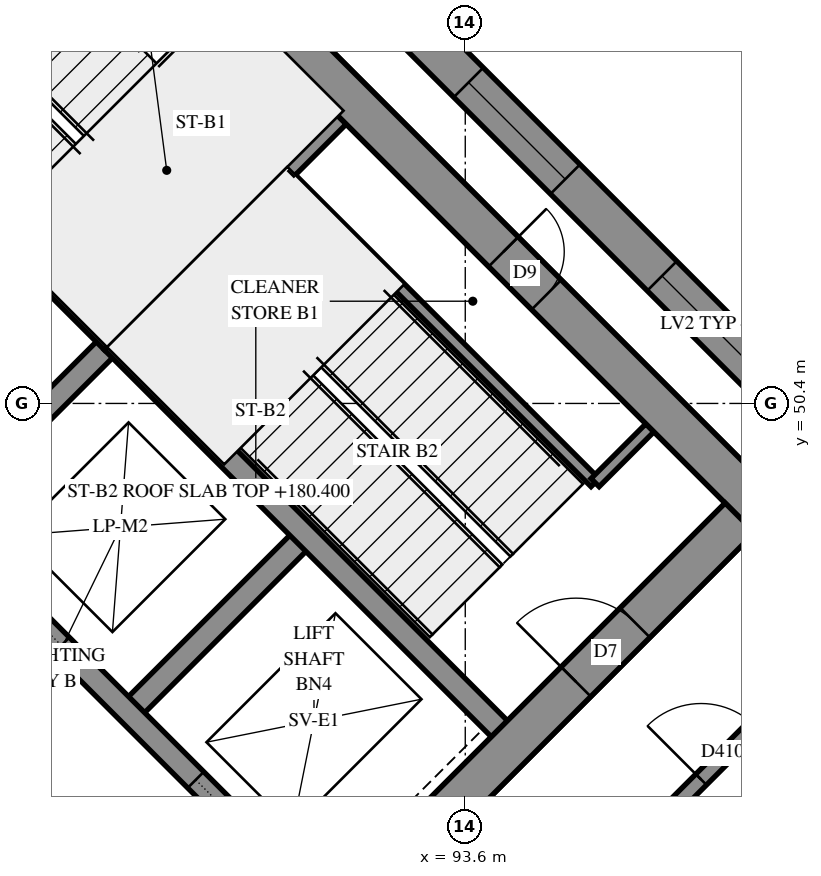
"""IFC4 building model, lengths in metres.
Left out: names, types, materials, properties, quantities, classifications, styles, units other than length and angle.
Written with IfcOpenShell. Run it as: python <this file> out.ifc"""

import sys

from ifc_helpers import new_model, si_unit, direction, frame, frame_2d, origin, place, context, subcontext, project, spatial, polyline, rectangle, outline, extrude, element, fill, save


model = new_model("IFC4")
c1 = context("Model", 3, precision=1e-05, world=origin(), true_north=direction((0.0, 1.0)))
c2 = subcontext(c1, "Body", "Model", "MODEL_VIEW")
j1 = project(units=[si_unit("LENGTHUNIT", "METRE"), si_unit("PLANEANGLEUNIT", "RADIAN")], contexts=[c1])
p1 = place(None, origin())
s1 = spatial("IfcSite", under=j1, at=p1, CompositionType="ELEMENT")
p2 = place(p1, origin())
s2 = spatial("IfcBuilding", under=s1, at=p2, CompositionType="ELEMENT")
p3 = place(p2, frame((0.0, 0.0, 180.4)))
s3 = spatial("IfcBuildingStorey", under=s2, at=p3, CompositionType="ELEMENT", Elevation=180.4)
p4 = place(p3, frame((86.642, 59.855, -0.3), z_axis=(0.0, 0.0, 1.0), x_axis=(0.707110007, -0.7071035554, 0.0)))
e1 = element("IfcWall", 1, at=p4, inside=s3, PredefinedType="SHEAR", context=c2, shape_type="SweptSolid", body=[
    extrude(rectangle(XDim=15.5, YDim=0.55, at=frame_2d((7.75, 0.0))), origin(), (0.0, 0.0, 1.0), 4.3),
])
p5 = place(p4, frame((10.55, 0.0, 0.3)))
e2 = element("IfcOpeningElement", 2, at=p5, cuts=e1, PredefinedType="OPENING", context=c2, shape_type="SweptSolid", body=[
    extrude(rectangle(XDim=0.8, YDim=2.1, at=frame_2d((0.4, 1.05))), frame((0.0, 0.285, 0.0), z_axis=(0.0, -1.0, 0.0), x_axis=(1.0, 0.0, 0.0)), (0.0, 0.0, 1.0), 0.57),
])
p6 = place(p3, frame((87.031, 38.713, -0.3), z_axis=(0.0, 0.0, 1.0), x_axis=(0.707103309, 0.7071102534, 0.0)))
e3 = element("IfcWall", 3, at=p6, inside=s3, PredefinedType="SHEAR", context=c2, shape_type="SweptSolid", body=[
    extrude(rectangle(XDim=14.4, YDim=0.55, at=frame_2d((7.2, 0.0))), origin(), (0.0, 0.0, 1.0), 4.3),
])
p7 = place(p6, frame((4.55, 0.0, 0.3)))
e4 = element("IfcOpeningElement", 4, at=p7, cuts=e3, PredefinedType="OPENING", context=c2, shape_type="SweptSolid", body=[
    extrude(rectangle(XDim=1.1, YDim=2.1, at=frame_2d((0.55, 1.05))), frame((0.0, 0.285, 0.0), z_axis=(0.0, -1.0, 0.0), x_axis=(1.0, 0.0, 0.0)), (0.0, 0.0, 1.0), 0.57),
])
p8 = place(p6, frame((11.35, 0.0, 0.3)))
e5 = element("IfcOpeningElement", 5, at=p8, cuts=e3, PredefinedType="OPENING", context=c2, shape_type="SweptSolid", body=[
    extrude(rectangle(XDim=1.1, YDim=2.1, at=frame_2d((0.55, 1.05))), frame((0.0, 0.285, 0.0), z_axis=(0.0, -1.0, 0.0), x_axis=(1.0, 0.0, 0.0)), (0.0, 0.0, 1.0), 0.57),
])
for number, where, z_axis, x_axis in (
    (6, (86.625, 48.878, 0.0), (0.0, 0.0, 1.0), (0.707, 0.707, 0.0)),
    (7, (89.17, 46.332, 0.0), (0.0, 0.0, 1.0), (0.707, 0.707, 0.0)),
):
    element("IfcWall", number, at=place(p3, frame(where, z_axis=z_axis, x_axis=x_axis)), inside=s3, PredefinedType="SOLIDWALL", context=c2, shape_type="SweptSolid", body=[
        extrude(rectangle(XDim=3.3, YDim=0.3, at=frame_2d((1.65, 0.0))), origin(), (0.0, 0.0, 1.0), 4.7),
    ])
p9 = place(p3, frame((78.988, 51.423, 0.0), z_axis=(0.0, 0.0, 1.0), x_axis=(0.7071067812, -0.7071067812, 0.0)))
e8 = element("IfcWall", 8, at=p9, inside=s3, PredefinedType="SOLIDWALL", context=c2, shape_type="SweptSolid", body=[
    extrude(rectangle(XDim=14.4, YDim=0.3, at=frame_2d((7.2, 0.0))), origin(), (0.0, 0.0, 1.0), 4.7),
])
p10 = place(p9, frame((1.35, 0.0, 0.0)))
e9 = element("IfcOpeningElement", 9, at=p10, cuts=e8, PredefinedType="OPENING", context=c2, shape_type="SweptSolid", body=[
    extrude(rectangle(XDim=0.9, YDim=2.1, at=frame_2d((0.45, 1.05))), frame((0.0, 0.16, 0.0), z_axis=(0.0, -1.0, 0.0), x_axis=(1.0, 0.0, 0.0)), (0.0, 0.0, 1.0), 0.32),
])
p11 = place(p9, frame((4.95, 0.0, 0.0)))
e10 = element("IfcOpeningElement", 10, at=p11, cuts=e8, PredefinedType="OPENING", context=c2, shape_type="SweptSolid", body=[
    extrude(rectangle(XDim=0.9, YDim=2.1, at=frame_2d((0.45, 1.05))), frame((0.0, 0.16, 0.0), z_axis=(0.0, -1.0, 0.0), x_axis=(1.0, 0.0, 0.0)), (0.0, 0.0, 1.0), 0.32),
])
p12 = place(p9, frame((8.55, 0.0, 0.0)))
e11 = element("IfcOpeningElement", 11, at=p12, cuts=e8, PredefinedType="OPENING", context=c2, shape_type="SweptSolid", body=[
    extrude(rectangle(XDim=0.9, YDim=2.1, at=frame_2d((0.45, 1.05))), frame((0.0, 0.16, 0.0), z_axis=(0.0, -1.0, 0.0), x_axis=(1.0, 0.0, 0.0)), (0.0, 0.0, 1.0), 0.32),
])
p13 = place(p9, frame((12.05, 0.0, 0.0)))
e12 = element("IfcOpeningElement", 12, at=p13, cuts=e8, PredefinedType="OPENING", context=c2, shape_type="SweptSolid", body=[
    extrude(rectangle(XDim=1.1, YDim=2.1, at=frame_2d((0.55, 1.05))), frame((0.0, 0.16, 0.0), z_axis=(0.0, -1.0, 0.0), x_axis=(1.0, 0.0, 0.0)), (0.0, 0.0, 1.0), 0.32),
])
p14 = place(p3, frame((81.534, 53.969, 0.0), z_axis=(0.0, 0.0, 1.0), x_axis=(0.707103309, -0.7071102534, 0.0)))
e13 = element("IfcWall", 13, at=p14, inside=s3, PredefinedType="SOLIDWALL", context=c2, shape_type="SweptSolid", body=[
    extrude(rectangle(XDim=14.4, YDim=0.3, at=frame_2d((7.2, 0.0))), origin(), (0.0, 0.0, 1.0), 4.7),
])
p15 = place(p14, frame((1.25, 0.0, 0.0)))
e14 = element("IfcOpeningElement", 14, at=p15, cuts=e13, PredefinedType="OPENING", context=c2, shape_type="SweptSolid", body=[
    extrude(rectangle(XDim=1.1, YDim=2.1, at=frame_2d((0.55, 1.05))), frame((0.0, 0.16, 0.0), z_axis=(0.0, -1.0, 0.0), x_axis=(1.0, 0.0, 0.0)), (0.0, 0.0, 1.0), 0.32),
])
p16 = place(p14, frame((4.85, 0.0, 0.0)))
e15 = element("IfcOpeningElement", 15, at=p16, cuts=e13, PredefinedType="OPENING", context=c2, shape_type="SweptSolid", body=[
    extrude(rectangle(XDim=1.1, YDim=2.1, at=frame_2d((0.55, 1.05))), frame((0.0, 0.16, 0.0), z_axis=(0.0, -1.0, 0.0), x_axis=(1.0, 0.0, 0.0)), (0.0, 0.0, 1.0), 0.32),
])
p17 = place(p14, frame((8.45, 0.0, 0.0)))
e16 = element("IfcOpeningElement", 16, at=p17, cuts=e13, PredefinedType="OPENING", context=c2, shape_type="SweptSolid", body=[
    extrude(rectangle(XDim=1.1, YDim=2.1, at=frame_2d((0.55, 1.05))), frame((0.0, 0.16, 0.0), z_axis=(0.0, -1.0, 0.0), x_axis=(1.0, 0.0, 0.0)), (0.0, 0.0, 1.0), 0.32),
])
p18 = place(p14, frame((12.05, 0.0, 0.0)))
e17 = element("IfcOpeningElement", 17, at=p18, cuts=e13, PredefinedType="OPENING", context=c2, shape_type="SweptSolid", body=[
    extrude(rectangle(XDim=1.1, YDim=2.1, at=frame_2d((0.55, 1.05))), frame((0.0, 0.16, 0.0), z_axis=(0.0, -1.0, 0.0), x_axis=(1.0, 0.0, 0.0)), (0.0, 0.0, 1.0), 0.32),
])
for number, where, z_axis, x_axis in (
    (18, (83.867, 56.302, 0.0), (0.0, 0.0, 1.0), (0.707, -0.707, 0.0)),
    (19, (88.958, 51.211, 0.0), (0.0, 0.0, 1.0), (0.707, -0.707, 0.0)),
):
    element("IfcWall", number, at=place(p3, frame(where, z_axis=z_axis, x_axis=x_axis)), inside=s3, PredefinedType="SOLIDWALL", context=c2, shape_type="SweptSolid", body=[
        extrude(rectangle(XDim=7.2, YDim=0.3, at=frame_2d((3.6, 0.0))), origin(), (0.0, 0.0, 1.0), 4.7),
    ])
p19 = place(p3, frame((88.958, 51.211, 0.0), z_axis=(0.0, 0.0, 1.0), x_axis=(0.7071067812, 0.7071067812, 0.0)))
e20 = element("IfcWall", 20, at=p19, inside=s3, PredefinedType="SOLIDWALL", context=c2, shape_type="SweptSolid", body=[
    extrude(rectangle(XDim=4.2, YDim=0.3, at=frame_2d((2.1, 0.0))), origin(), (0.0, 0.0, 1.0), 4.7),
])
p20 = place(p3, frame((100.024, 48.241, 0.0), z_axis=(0.0, 0.0, 1.0), x_axis=(-0.7071067812, 0.7071067812, 0.0)))
e21 = element("IfcWall", 21, at=p20, inside=s3, PredefinedType="SOLIDWALL", context=c2, shape_type="SweptSolid", body=[
    extrude(outline(polyline([(-0.275, -0.275), (30.779, -0.275), (30.552, 0.275), (0.275, 0.275), (-0.275, -0.275)])), origin(), (0.0, 0.0, 1.0), 4.7),
])
p21 = place(p20, frame((3.625, 0.0, 0.9)))
e22 = element("IfcOpeningElement", 22, at=p21, cuts=e21, PredefinedType="OPENING", context=c2, shape_type="SweptSolid", body=[
    extrude(rectangle(XDim=1.8, YDim=3.6, at=frame_2d((0.9, 1.8))), frame((0.0, 0.285, 0.0), z_axis=(0.0, -1.0, 0.0), x_axis=(1.0, 0.0, 0.0)), (0.0, 0.0, 1.0), 0.57),
])
p22 = place(p20, frame((7.225, 0.0, 0.9)))
e23 = element("IfcOpeningElement", 23, at=p22, cuts=e21, PredefinedType="OPENING", context=c2, shape_type="SweptSolid", body=[
    extrude(rectangle(XDim=1.8, YDim=3.6, at=frame_2d((0.9, 1.8))), frame((0.0, 0.285, 0.0), z_axis=(0.0, -1.0, 0.0), x_axis=(1.0, 0.0, 0.0)), (0.0, 0.0, 1.0), 0.57),
])
p23 = place(p20, frame((10.825, 0.0, 0.9)))
e24 = element("IfcOpeningElement", 24, at=p23, cuts=e21, PredefinedType="OPENING", context=c2, shape_type="SweptSolid", body=[
    extrude(rectangle(XDim=1.8, YDim=3.6, at=frame_2d((0.9, 1.8))), frame((0.0, 0.285, 0.0), z_axis=(0.0, -1.0, 0.0), x_axis=(1.0, 0.0, 0.0)), (0.0, 0.0, 1.0), 0.57),
])
p24 = place(p20, frame((14.425, 0.0, 0.9)))
e25 = element("IfcOpeningElement", 25, at=p24, cuts=e21, PredefinedType="OPENING", context=c2, shape_type="SweptSolid", body=[
    extrude(rectangle(XDim=1.8, YDim=3.6, at=frame_2d((0.9, 1.8))), frame((0.0, 0.285, 0.0), z_axis=(0.0, -1.0, 0.0), x_axis=(1.0, 0.0, 0.0)), (0.0, 0.0, 1.0), 0.57),
])
p25 = place(p20, frame((17.575, 0.0, 0.9)))
e26 = element("IfcOpeningElement", 26, at=p25, cuts=e21, PredefinedType="OPENING", context=c2, shape_type="SweptSolid", body=[
    extrude(rectangle(XDim=1.8, YDim=3.6, at=frame_2d((0.9, 1.8))), frame((0.0, 0.285, 0.0), z_axis=(0.0, -1.0, 0.0), x_axis=(1.0, 0.0, 0.0)), (0.0, 0.0, 1.0), 0.57),
])
p26 = place(p20, frame((21.625, 0.0, 0.9)))
e27 = element("IfcOpeningElement", 27, at=p26, cuts=e21, PredefinedType="OPENING", context=c2, shape_type="SweptSolid", body=[
    extrude(rectangle(XDim=1.8, YDim=3.6, at=frame_2d((0.9, 1.8))), frame((0.0, 0.285, 0.0), z_axis=(0.0, -1.0, 0.0), x_axis=(1.0, 0.0, 0.0)), (0.0, 0.0, 1.0), 0.57),
])
p27 = place(p20, frame((25.225, 0.0, 0.9)))
e28 = element("IfcOpeningElement", 28, at=p27, cuts=e21, PredefinedType="OPENING", context=c2, shape_type="SweptSolid", body=[
    extrude(rectangle(XDim=1.8, YDim=3.6, at=frame_2d((0.9, 1.8))), frame((0.0, 0.285, 0.0), z_axis=(0.0, -1.0, 0.0), x_axis=(1.0, 0.0, 0.0)), (0.0, 0.0, 1.0), 0.57),
])
p28 = place(p20, frame((28.438, 0.0, 0.9)))
e29 = element("IfcOpeningElement", 29, at=p28, cuts=e21, PredefinedType="OPENING", context=c2, shape_type="SweptSolid", body=[
    extrude(rectangle(XDim=1.8, YDim=3.6, at=frame_2d((0.9, 1.8))), frame((0.0, 0.285, 0.0), z_axis=(0.0, -1.0, 0.0), x_axis=(1.0, 0.0, 0.0)), (0.0, 0.0, 1.0), 0.57),
])
p29 = place(p3, frame((78.312, 45.275, 0.0), z_axis=(0.0, 0.0, 1.0), x_axis=(0.7071035873, -0.707109975, 0.0)))
e30 = element("IfcWall", 30, at=p29, inside=s3, PredefinedType="SOLIDWALL", context=c2, shape_type="SweptSolid", body=[
    extrude(outline(polyline([(0.114, -0.275), (15.93, -0.275), (15.38, 0.275), (-0.114, 0.275), (0.114, -0.275)])), origin(), (0.0, 0.0, 1.0), 4.7),
])
p30 = place(p29, frame((4.23, 0.0, 0.9)))
e31 = element("IfcOpeningElement", 31, at=p30, cuts=e30, PredefinedType="OPENING", context=c2, shape_type="SweptSolid", body=[
    extrude(rectangle(XDim=1.8, YDim=3.6, at=frame_2d((0.9, 1.8))), frame((0.0, 0.285, 0.0), z_axis=(0.0, -1.0, 0.0), x_axis=(1.0, 0.0, 0.0)), (0.0, 0.0, 1.0), 0.57),
])
p31 = place(p29, frame((7.83, 0.0, 0.9)))
e32 = element("IfcOpeningElement", 32, at=p31, cuts=e30, PredefinedType="OPENING", context=c2, shape_type="SweptSolid", body=[
    extrude(rectangle(XDim=1.8, YDim=3.6, at=frame_2d((0.9, 1.8))), frame((0.0, 0.285, 0.0), z_axis=(0.0, -1.0, 0.0), x_axis=(1.0, 0.0, 0.0)), (0.0, 0.0, 1.0), 0.57),
])
p32 = place(p29, frame((10.53, 0.0, 0.9)))
e33 = element("IfcOpeningElement", 33, at=p32, cuts=e30, PredefinedType="OPENING", context=c2, shape_type="SweptSolid", body=[
    extrude(rectangle(XDim=1.8, YDim=3.6, at=frame_2d((0.9, 1.8))), frame((0.0, 0.285, 0.0), z_axis=(0.0, -1.0, 0.0), x_axis=(1.0, 0.0, 0.0)), (0.0, 0.0, 1.0), 0.57),
])
p33 = place(p3, frame((102.747, 49.938, 0.0), z_axis=(0.0, 0.0, 1.0), x_axis=(-0.7071083109, 0.7071052514, 0.0)))
e34 = element("IfcWall", 34, at=p33, inside=s3, PredefinedType="SOLIDWALL", context=c2, shape_type="SweptSolid", body=[
    extrude(outline(polyline([(-0.1, -0.1), (32.726, -0.1), (32.644, 0.1), (0.1, 0.1), (-0.1, -0.1)])), origin(), (0.0, 0.0, 1.0), 4.7),
])
p34 = place(p3, frame((91.313, 53.354, 0.0), z_axis=(0.0, 0.0, 1.0), x_axis=(0.7071067812, -0.7071067812, 0.0)))
e35 = element("IfcWall", 35, at=p34, inside=s3, PredefinedType="PARTITIONING", context=c2, shape_type="SweptSolid", body=[
    extrude(rectangle(XDim=5.65, YDim=0.15, at=frame_2d((2.825, 0.0))), origin(), (0.0, 0.0, 1.0), 4.7),
])
p35 = place(p3, frame((95.308, 49.358, 0.0), z_axis=(0.0, 0.0, 1.0), x_axis=(0.70705776, 0.707155799, 0.0)))
e36 = element("IfcWall", 36, at=p35, inside=s3, PredefinedType="PARTITIONING", context=c2, shape_type="SweptSolid", body=[
    extrude(rectangle(XDim=1.02, YDim=0.15, at=frame_2d((0.51, 0.0))), origin(), (0.0, 0.0, 1.0), 4.7),
])
p36 = place(p3, frame((94.225, 42.974, 0.0), z_axis=(0.0, 0.0, 1.0), x_axis=(0.7071134042, 0.7071001581, 0.0)))
e37 = element("IfcWall", 37, at=p36, inside=s3, PredefinedType="PARTITIONING", context=c2, shape_type="SweptSolid", body=[
    extrude(rectangle(XDim=7.549, YDim=0.2, at=frame_2d((3.775, 0.0))), origin(), (0.0, 0.0, 1.0), 4.7),
])
p37 = place(p36, frame((3.504, 0.0, 0.0)))
e38 = element("IfcOpeningElement", 38, at=p37, cuts=e37, PredefinedType="OPENING", context=c2, shape_type="SweptSolid", body=[
    extrude(rectangle(XDim=1.0, YDim=2.1, at=frame_2d((0.5, 1.05))), frame((0.0, 0.11, 0.0), z_axis=(0.0, -1.0, 0.0), x_axis=(1.0, 0.0, 0.0)), (0.0, 0.0, 1.0), 0.22),
])
p38 = place(p21, origin())
e39 = element("IfcWindow", 39, at=p38, inside=s3, PartitioningType="SINGLE_PANEL", PredefinedType="WINDOW", context=c2, shape_type="SweptSolid", body=[
    extrude(rectangle(XDim=1.8, YDim=3.6, at=frame_2d((0.9, 1.8))), frame((0.0, 0.155, 0.0), z_axis=(0.0, -1.0, 0.0), x_axis=(1.0, 0.0, 0.0)), (0.0, 0.0, 1.0), 0.06),
])
fill(e22, e39)
p39 = place(p22, origin())
e40 = element("IfcWindow", 40, at=p39, inside=s3, PartitioningType="SINGLE_PANEL", PredefinedType="WINDOW", context=c2, shape_type="SweptSolid", body=[
    extrude(rectangle(XDim=1.8, YDim=3.6, at=frame_2d((0.9, 1.8))), frame((0.0, 0.155, 0.0), z_axis=(0.0, -1.0, 0.0), x_axis=(1.0, 0.0, 0.0)), (0.0, 0.0, 1.0), 0.06),
])
fill(e23, e40)
p40 = place(p5, origin())
e41 = element("IfcDoor", 41, at=p40, inside=s3, OperationType="SINGLE_SWING_RIGHT", PredefinedType="DOOR", context=c2, shape_type="SweptSolid", body=[
    extrude(rectangle(XDim=0.8, YDim=2.1, at=frame_2d((0.4, 1.05))), frame((0.0, 0.025, 0.0), z_axis=(0.0, -1.0, 0.0), x_axis=(1.0, 0.0, 0.0)), (0.0, 0.0, 1.0), 0.05),
])
fill(e2, e41)
p41 = place(p8, origin())
e42 = element("IfcDoor", 42, at=p41, inside=s3, OperationType="SINGLE_SWING_RIGHT", PredefinedType="DOOR", context=c2, shape_type="SweptSolid", body=[
    extrude(rectangle(XDim=1.1, YDim=2.1, at=frame_2d((0.55, 1.05))), frame((0.0, 0.025, 0.0), z_axis=(0.0, -1.0, 0.0), x_axis=(1.0, 0.0, 0.0)), (0.0, 0.0, 1.0), 0.05),
])
fill(e5, e42)
p42 = place(p17, origin())
e43 = element("IfcDoor", 43, at=p42, inside=s3, OperationType="SLIDING_TO_LEFT", PredefinedType="DOOR", context=c2, shape_type="SweptSolid", body=[
    extrude(rectangle(XDim=1.1, YDim=2.1, at=frame_2d((0.55, 1.05))), frame((0.0, 0.025, 0.0), z_axis=(0.0, -1.0, 0.0), x_axis=(1.0, 0.0, 0.0)), (0.0, 0.0, 1.0), 0.05),
])
fill(e16, e43)
p43 = place(p18, origin())
e44 = element("IfcDoor", 44, at=p43, inside=s3, OperationType="SLIDING_TO_RIGHT", PredefinedType="DOOR", context=c2, shape_type="SweptSolid", body=[
    extrude(rectangle(XDim=1.1, YDim=2.1, at=frame_2d((0.55, 1.05))), frame((0.0, 0.025, 0.0), z_axis=(0.0, -1.0, 0.0), x_axis=(1.0, 0.0, 0.0)), (0.0, 0.0, 1.0), 0.05),
])
fill(e17, e44)
p44 = place(p37, origin())
e45 = element("IfcDoor", 45, at=p44, inside=s3, OperationType="SINGLE_SWING_LEFT", PredefinedType="DOOR", context=c2, shape_type="SweptSolid", body=[
    extrude(rectangle(XDim=1.0, YDim=2.1, at=frame_2d((0.5, 1.05))), frame((0.0, 0.025, 0.0), z_axis=(0.0, -1.0, 0.0), x_axis=(1.0, 0.0, 0.0)), (0.0, 0.0, 1.0), 0.05),
])
fill(e38, e45)
save(model, sys.argv[1])
